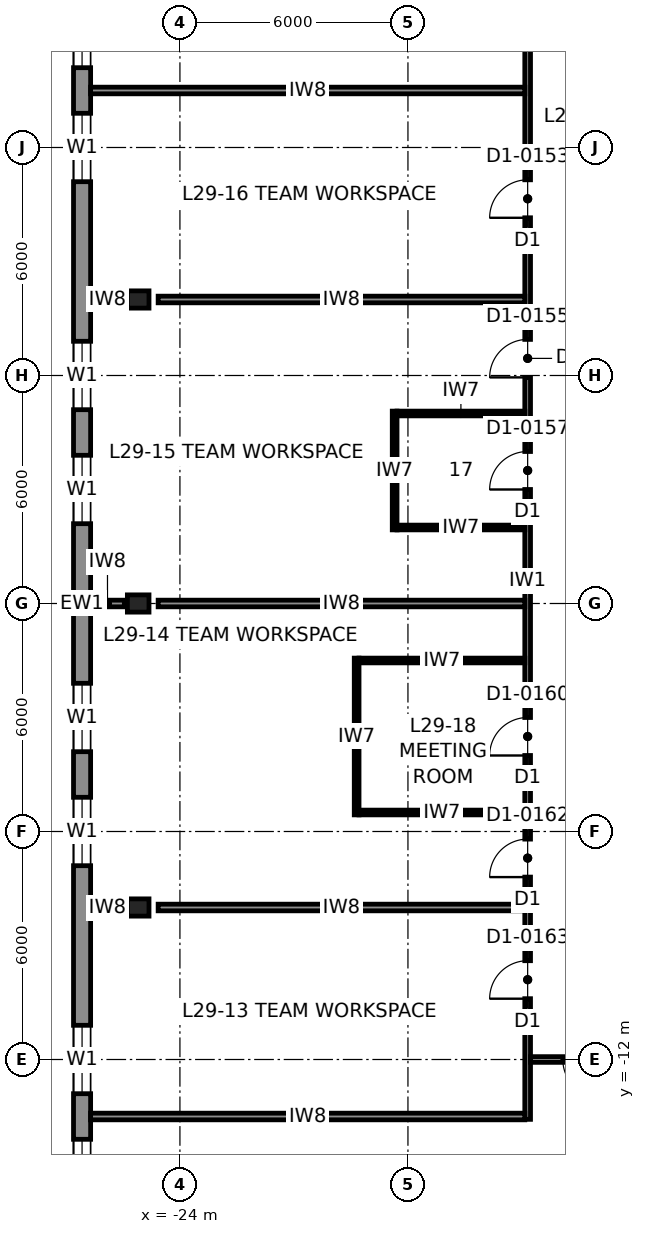
"""IFC4 building model, lengths in metres.
Left out: names, types, materials, properties, quantities, classifications, styles, units other than length and angle.
Written with IfcOpenShell. Run it as: python <this file> out.ifc"""

import sys

from ifc_helpers import new_model, si_unit, direction, frame, frame_2d, origin, origin_2d, place, context, subcontext, project, spatial, rectangle, i_section, extrude, element, fill, save


model = new_model("IFC4")
c1 = context("Model", 3, precision=1e-05, world=origin(), true_north=direction((0.0, 1.0)))
c2 = subcontext(c1, "Body", "Model", "MODEL_VIEW")
j1 = project(units=[si_unit("LENGTHUNIT", "METRE"), si_unit("PLANEANGLEUNIT", "RADIAN")], contexts=[c1])
p1 = place(None, origin())
s1 = spatial("IfcSite", under=j1, at=p1, CompositionType="ELEMENT")
p2 = place(p1, origin())
s2 = spatial("IfcBuilding", under=s1, at=p2, CompositionType="ELEMENT")
p3 = place(p2, frame((0.0, 0.0, 143.8)))
s3 = spatial("IfcBuildingStorey", under=s2, at=p3, CompositionType="ELEMENT", Elevation=143.8)
for number, where, z_axis, x_axis in (
    (1, (-25.098, 0.0, 0.0), (0.04, 0.0, 0.999), (0.0, 1.0, 0.0)),
    (2, (-25.098, 8.0, 0.0), (0.04, 0.0, 0.999), (0.0, 1.0, 0.0)),
    (3, (-25.098, -8.0, 0.0), (0.04, 0.0, 0.999), (0.0, 1.0, 0.0)),
):
    element("IfcColumn", number, at=place(p3, frame(where, z_axis=z_axis, x_axis=x_axis)), inside=s3, PredefinedType="COLUMN", context=c2, shape_type="SweptSolid", body=[
        extrude(i_section(OverallWidth=0.454, OverallDepth=0.569, WebThickness=0.078, FlangeThickness=0.125, at=origin_2d()), origin(), (0.0, 0.0, 1.0), 4.003),
    ])
p4 = place(p3, frame((-26.575, 22.3, 0.0), z_axis=(0.0, 0.0, 1.0), x_axis=(0.0, -1.0, 0.0)))
e4 = element("IfcWall", 4, at=p4, inside=s3, PredefinedType="SOLIDWALL", context=c2, shape_type="SweptSolid", body=[
    extrude(rectangle(XDim=44.6, YDim=0.45, at=frame_2d((22.3, 0.0))), origin(), (0.0, 0.0, 1.0), 3.83),
])
p5 = place(p4, frame((3.4, 0.0, 0.7)))
e5 = element("IfcOpeningElement", 5, at=p5, cuts=e4, PredefinedType="OPENING", context=c2, shape_type="SweptSolid", body=[
    extrude(rectangle(XDim=1.8, YDim=2.6, at=frame_2d((0.9, 1.3))), frame((0.0, 0.235, 0.0), z_axis=(0.0, -1.0, 0.0), x_axis=(1.0, 0.0, 0.0)), (0.0, 0.0, 1.0), 0.47),
])
p6 = place(p4, frame((6.4, 0.0, 0.7)))
e6 = element("IfcOpeningElement", 6, at=p6, cuts=e4, PredefinedType="OPENING", context=c2, shape_type="SweptSolid", body=[
    extrude(rectangle(XDim=1.8, YDim=2.6, at=frame_2d((0.9, 1.3))), frame((0.0, 0.235, 0.0), z_axis=(0.0, -1.0, 0.0), x_axis=(1.0, 0.0, 0.0)), (0.0, 0.0, 1.0), 0.47),
])
p7 = place(p4, frame((9.4, 0.0, 0.7)))
e7 = element("IfcOpeningElement", 7, at=p7, cuts=e4, PredefinedType="OPENING", context=c2, shape_type="SweptSolid", body=[
    extrude(rectangle(XDim=1.8, YDim=2.6, at=frame_2d((0.9, 1.3))), frame((0.0, 0.235, 0.0), z_axis=(0.0, -1.0, 0.0), x_axis=(1.0, 0.0, 0.0)), (0.0, 0.0, 1.0), 0.47),
])
p8 = place(p4, frame((15.4, 0.0, 0.7)))
e8 = element("IfcOpeningElement", 8, at=p8, cuts=e4, PredefinedType="OPENING", context=c2, shape_type="SweptSolid", body=[
    extrude(rectangle(XDim=1.8, YDim=2.6, at=frame_2d((0.9, 1.3))), frame((0.0, 0.235, 0.0), z_axis=(0.0, -1.0, 0.0), x_axis=(1.0, 0.0, 0.0)), (0.0, 0.0, 1.0), 0.47),
])
p9 = place(p4, frame((18.4, 0.0, 0.7)))
e9 = element("IfcOpeningElement", 9, at=p9, cuts=e4, PredefinedType="OPENING", context=c2, shape_type="SweptSolid", body=[
    extrude(rectangle(XDim=1.8, YDim=2.6, at=frame_2d((0.9, 1.3))), frame((0.0, 0.235, 0.0), z_axis=(0.0, -1.0, 0.0), x_axis=(1.0, 0.0, 0.0)), (0.0, 0.0, 1.0), 0.47),
])
p10 = place(p4, frame((24.4, 0.0, 0.7)))
e10 = element("IfcOpeningElement", 10, at=p10, cuts=e4, PredefinedType="OPENING", context=c2, shape_type="SweptSolid", body=[
    extrude(rectangle(XDim=1.8, YDim=2.6, at=frame_2d((0.9, 1.3))), frame((0.0, 0.235, 0.0), z_axis=(0.0, -1.0, 0.0), x_axis=(1.0, 0.0, 0.0)), (0.0, 0.0, 1.0), 0.47),
])
p11 = place(p4, frame((27.4, 0.0, 0.7)))
e11 = element("IfcOpeningElement", 11, at=p11, cuts=e4, PredefinedType="OPENING", context=c2, shape_type="SweptSolid", body=[
    extrude(rectangle(XDim=1.8, YDim=2.6, at=frame_2d((0.9, 1.3))), frame((0.0, 0.235, 0.0), z_axis=(0.0, -1.0, 0.0), x_axis=(1.0, 0.0, 0.0)), (0.0, 0.0, 1.0), 0.47),
])
p12 = place(p4, frame((33.4, 0.0, 0.7)))
e12 = element("IfcOpeningElement", 12, at=p12, cuts=e4, PredefinedType="OPENING", context=c2, shape_type="SweptSolid", body=[
    extrude(rectangle(XDim=1.8, YDim=2.6, at=frame_2d((0.9, 1.3))), frame((0.0, 0.235, 0.0), z_axis=(0.0, -1.0, 0.0), x_axis=(1.0, 0.0, 0.0)), (0.0, 0.0, 1.0), 0.47),
])
p13 = place(p4, frame((36.4, 0.0, 0.7)))
e13 = element("IfcOpeningElement", 13, at=p13, cuts=e4, PredefinedType="OPENING", context=c2, shape_type="SweptSolid", body=[
    extrude(rectangle(XDim=1.8, YDim=2.6, at=frame_2d((0.9, 1.3))), frame((0.0, 0.235, 0.0), z_axis=(0.0, -1.0, 0.0), x_axis=(1.0, 0.0, 0.0)), (0.0, 0.0, 1.0), 0.47),
])
p14 = place(p4, frame((39.4, 0.0, 0.7)))
e14 = element("IfcOpeningElement", 14, at=p14, cuts=e4, PredefinedType="OPENING", context=c2, shape_type="SweptSolid", body=[
    extrude(rectangle(XDim=1.8, YDim=2.6, at=frame_2d((0.9, 1.3))), frame((0.0, 0.235, 0.0), z_axis=(0.0, -1.0, 0.0), x_axis=(1.0, 0.0, 0.0)), (0.0, 0.0, 1.0), 0.47),
])
p15 = place(p3, frame((-14.85, 14.775, 0.0), z_axis=(0.0, 0.0, 1.0), x_axis=(0.0, -1.0, 0.0)))
e15 = element("IfcWall", 15, at=p15, inside=s3, PredefinedType="PARTITIONING", context=c2, shape_type="SweptSolid", body=[
    extrude(rectangle(XDim=28.35, YDim=0.15, at=frame_2d((14.175, 0.0))), origin(), (0.0, 0.0, 1.0), 3.83),
])
p16 = place(p15, frame((24.175, 0.0, 0.0)))
e16 = element("IfcOpeningElement", 16, at=p16, cuts=e15, PredefinedType="OPENING", context=c2, shape_type="SweptSolid", body=[
    extrude(rectangle(XDim=1.0, YDim=2.3, at=frame_2d((0.5, 1.15))), frame((0.0, 0.085, 0.0), z_axis=(0.0, -1.0, 0.0), x_axis=(1.0, 0.0, 0.0)), (0.0, 0.0, 1.0), 0.17),
])
p17 = place(p15, frame((20.975, 0.0, 0.0)))
e17 = element("IfcOpeningElement", 17, at=p17, cuts=e15, PredefinedType="OPENING", context=c2, shape_type="SweptSolid", body=[
    extrude(rectangle(XDim=1.0, YDim=2.3, at=frame_2d((0.5, 1.15))), frame((0.0, 0.085, 0.0), z_axis=(0.0, -1.0, 0.0), x_axis=(1.0, 0.0, 0.0)), (0.0, 0.0, 1.0), 0.17),
])
p18 = place(p15, frame((7.825, 0.0, 0.0)))
e18 = element("IfcOpeningElement", 18, at=p18, cuts=e15, PredefinedType="OPENING", context=c2, shape_type="SweptSolid", body=[
    extrude(rectangle(XDim=1.0, YDim=2.3, at=frame_2d((0.5, 1.15))), frame((0.0, 0.085, 0.0), z_axis=(0.0, -1.0, 0.0), x_axis=(1.0, 0.0, 0.0)), (0.0, 0.0, 1.0), 0.17),
])
p19 = place(p15, frame((3.625, 0.0, 0.0)))
e19 = element("IfcOpeningElement", 19, at=p19, cuts=e15, PredefinedType="OPENING", context=c2, shape_type="SweptSolid", body=[
    extrude(rectangle(XDim=1.0, YDim=2.3, at=frame_2d((0.5, 1.15))), frame((0.0, 0.085, 0.0), z_axis=(0.0, -1.0, 0.0), x_axis=(1.0, 0.0, 0.0)), (0.0, 0.0, 1.0), 0.17),
])
p20 = place(p15, frame((10.775, 0.0, 0.0)))
e20 = element("IfcOpeningElement", 20, at=p20, cuts=e15, PredefinedType="OPENING", context=c2, shape_type="SweptSolid", body=[
    extrude(rectangle(XDim=1.0, YDim=2.3, at=frame_2d((0.5, 1.15))), frame((0.0, 0.085, 0.0), z_axis=(0.0, -1.0, 0.0), x_axis=(1.0, 0.0, 0.0)), (0.0, 0.0, 1.0), 0.17),
])
p21 = place(p15, frame((17.775, 0.0, 0.0)))
e21 = element("IfcOpeningElement", 21, at=p21, cuts=e15, PredefinedType="OPENING", context=c2, shape_type="SweptSolid", body=[
    extrude(rectangle(XDim=1.0, YDim=2.3, at=frame_2d((0.5, 1.15))), frame((0.0, 0.085, 0.0), z_axis=(0.0, -1.0, 0.0), x_axis=(1.0, 0.0, 0.0)), (0.0, 0.0, 1.0), 0.17),
])
p22 = place(p3, frame((-12.0, -12.0, 0.0), z_axis=(0.0, 0.0, 1.0), x_axis=(-1.0, 0.0, 0.0)))
e22 = element("IfcWall", 22, at=p22, inside=s3, PredefinedType="PARTITIONING", context=c2, shape_type="SweptSolid", body=[
    extrude(rectangle(XDim=2.775, YDim=0.15, at=frame_2d((1.387, 0.0))), origin(), (0.0, 0.0, 1.0), 3.83),
])
p23 = place(p22, frame((0.925, 0.0, 0.0)))
e23 = element("IfcOpeningElement", 23, at=p23, cuts=e22, PredefinedType="OPENING", context=c2, shape_type="SweptSolid", body=[
    extrude(rectangle(XDim=1.0, YDim=2.3, at=frame_2d((0.5, 1.15))), frame((0.0, 0.085, 0.0), z_axis=(0.0, -1.0, 0.0), x_axis=(1.0, 0.0, 0.0)), (0.0, 0.0, 1.0), 0.17),
])
for number, where, z_axis, x_axis in (
    (24, (-26.35, 13.5, 0.0), (0.0, 0.0, 1.0), (1.0, 0.0, 0.0)),
    (25, (-14.925, -13.5, 0.0), (0.0, 0.0, 1.0), (-1.0, 0.0, 0.0)),
):
    element("IfcWall", number, at=place(p3, frame(where, z_axis=z_axis, x_axis=x_axis)), inside=s3, PredefinedType="PARTITIONING", context=c2, shape_type="SweptSolid", body=[
        extrude(rectangle(XDim=11.425, YDim=0.175, at=frame_2d((5.712, 0.0))), origin(), (0.0, 0.0, 1.0), 3.83),
    ])
p24 = place(p3, frame((-14.925, -8.0, 0.0), z_axis=(0.0, 0.0, 1.0), x_axis=(-1.0, 0.0, 0.0)))
e26 = element("IfcWall", 26, at=p24, inside=s3, PredefinedType="PARTITIONING", context=c2, shape_type="SweptSolid", body=[
    extrude(rectangle(XDim=9.648, YDim=0.175, at=frame_2d((4.824, 0.0))), origin(), (0.0, 0.0, 1.0), 2.83),
])
p25 = place(p3, frame((-25.462, -8.0, 0.0), z_axis=(0.0, 0.0, 1.0), x_axis=(-1.0, 0.0, 0.0)))
e27 = element("IfcWall", 27, at=p25, inside=s3, PredefinedType="PARTITIONING", context=c2, shape_type="SweptSolid", body=[
    extrude(rectangle(XDim=0.888, YDim=0.175, at=frame_2d((0.444, 0.0))), origin(), (0.0, 0.0, 1.0), 3.83),
])
p26 = place(p3, frame((-14.925, 0.0, 0.0), z_axis=(0.0, 0.0, 1.0), x_axis=(-1.0, 0.0, 0.0)))
e28 = element("IfcWall", 28, at=p26, inside=s3, PredefinedType="PARTITIONING", context=c2, shape_type="SweptSolid", body=[
    extrude(rectangle(XDim=9.648, YDim=0.175, at=frame_2d((4.824, 0.0))), origin(), (0.0, 0.0, 1.0), 2.83),
])
p27 = place(p3, frame((-25.462, 0.0, 0.0), z_axis=(0.0, 0.0, 1.0), x_axis=(-1.0, 0.0, 0.0)))
e29 = element("IfcWall", 29, at=p27, inside=s3, PredefinedType="PARTITIONING", context=c2, shape_type="SweptSolid", body=[
    extrude(rectangle(XDim=0.888, YDim=0.175, at=frame_2d((0.444, 0.0))), origin(), (0.0, 0.0, 1.0), 3.83),
])
p28 = place(p3, frame((-14.925, 8.0, 0.0), z_axis=(0.0, 0.0, 1.0), x_axis=(-1.0, 0.0, 0.0)))
e30 = element("IfcWall", 30, at=p28, inside=s3, PredefinedType="PARTITIONING", context=c2, shape_type="SweptSolid", body=[
    extrude(rectangle(XDim=9.648, YDim=0.175, at=frame_2d((4.824, 0.0))), origin(), (0.0, 0.0, 1.0), 2.83),
])
p29 = place(p3, frame((-25.462, 8.0, 0.0), z_axis=(0.0, 0.0, 1.0), x_axis=(-1.0, 0.0, 0.0)))
e31 = element("IfcWall", 31, at=p29, inside=s3, PredefinedType="PARTITIONING", context=c2, shape_type="SweptSolid", body=[
    extrude(rectangle(XDim=0.888, YDim=0.175, at=frame_2d((0.444, 0.0))), origin(), (0.0, 0.0, 1.0), 3.83),
])
p30 = place(p3, frame((-18.35, 1.938, 0.0), z_axis=(0.0, 0.0, 1.0), x_axis=(0.0, 1.0, 0.0)))
e32 = element("IfcWall", 32, at=p30, inside=s3, PredefinedType="PARTITIONING", context=c2, shape_type="SweptSolid", body=[
    extrude(rectangle(XDim=3.125, YDim=0.125, at=frame_2d((1.562, 0.0))), origin(), (0.0, 0.0, 1.0), 3.83),
])
for number, where, z_axis, x_axis in (
    (33, (-14.925, 2.0, 0.0), (0.0, 0.0, 1.0), (-1.0, 0.0, 0.0)),
    (34, (-14.925, 5.0, 0.0), (0.0, 0.0, 1.0), (-1.0, 0.0, 0.0)),
):
    element("IfcWall", number, at=place(p3, frame(where, z_axis=z_axis, x_axis=x_axis)), inside=s3, PredefinedType="PARTITIONING", context=c2, shape_type="SweptSolid", body=[
        extrude(rectangle(XDim=3.363, YDim=0.125, at=frame_2d((1.681, 0.0))), origin(), (0.0, 0.0, 1.0), 3.83),
    ])
p31 = place(p3, frame((-19.35, -5.562, 0.0), z_axis=(0.0, 0.0, 1.0), x_axis=(0.0, 1.0, 0.0)))
e35 = element("IfcWall", 35, at=p31, inside=s3, PredefinedType="PARTITIONING", context=c2, shape_type="SweptSolid", body=[
    extrude(rectangle(XDim=4.125, YDim=0.125, at=frame_2d((2.062, 0.0))), origin(), (0.0, 0.0, 1.0), 3.83),
])
for number, where, z_axis, x_axis in (
    (36, (-14.925, -5.5, 0.0), (0.0, 0.0, 1.0), (-1.0, 0.0, 0.0)),
    (37, (-14.925, -1.5, 0.0), (0.0, 0.0, 1.0), (-1.0, 0.0, 0.0)),
):
    element("IfcWall", number, at=place(p3, frame(where, z_axis=z_axis, x_axis=x_axis)), inside=s3, PredefinedType="PARTITIONING", context=c2, shape_type="SweptSolid", body=[
        extrude(rectangle(XDim=4.363, YDim=0.125, at=frame_2d((2.181, 0.0))), origin(), (0.0, 0.0, 1.0), 3.83),
    ])
p32 = place(p6, origin())
e38 = element("IfcWindow", 38, at=p32, inside=s3, PartitioningType="SINGLE_PANEL", PredefinedType="WINDOW", context=c2, shape_type="SweptSolid", body=[
    extrude(rectangle(XDim=1.8, YDim=2.6, at=frame_2d((0.9, 1.3))), frame((0.0, 0.03, 0.0), z_axis=(0.0, -1.0, 0.0), x_axis=(1.0, 0.0, 0.0)), (0.0, 0.0, 1.0), 0.06),
])
fill(e6, e38)
p33 = place(p7, origin())
e39 = element("IfcWindow", 39, at=p33, inside=s3, PartitioningType="SINGLE_PANEL", PredefinedType="WINDOW", context=c2, shape_type="SweptSolid", body=[
    extrude(rectangle(XDim=1.8, YDim=2.6, at=frame_2d((0.9, 1.3))), frame((0.0, 0.03, 0.0), z_axis=(0.0, -1.0, 0.0), x_axis=(1.0, 0.0, 0.0)), (0.0, 0.0, 1.0), 0.06),
])
fill(e7, e39)
p34 = place(p8, origin())
e40 = element("IfcWindow", 40, at=p34, inside=s3, PartitioningType="SINGLE_PANEL", PredefinedType="WINDOW", context=c2, shape_type="SweptSolid", body=[
    extrude(rectangle(XDim=1.8, YDim=2.6, at=frame_2d((0.9, 1.3))), frame((0.0, 0.03, 0.0), z_axis=(0.0, -1.0, 0.0), x_axis=(1.0, 0.0, 0.0)), (0.0, 0.0, 1.0), 0.06),
])
fill(e8, e40)
p35 = place(p9, origin())
e41 = element("IfcWindow", 41, at=p35, inside=s3, PartitioningType="SINGLE_PANEL", PredefinedType="WINDOW", context=c2, shape_type="SweptSolid", body=[
    extrude(rectangle(XDim=1.8, YDim=2.6, at=frame_2d((0.9, 1.3))), frame((0.0, 0.03, 0.0), z_axis=(0.0, -1.0, 0.0), x_axis=(1.0, 0.0, 0.0)), (0.0, 0.0, 1.0), 0.06),
])
fill(e9, e41)
p36 = place(p10, origin())
e42 = element("IfcWindow", 42, at=p36, inside=s3, PartitioningType="SINGLE_PANEL", PredefinedType="WINDOW", context=c2, shape_type="SweptSolid", body=[
    extrude(rectangle(XDim=1.8, YDim=2.6, at=frame_2d((0.9, 1.3))), frame((0.0, 0.03, 0.0), z_axis=(0.0, -1.0, 0.0), x_axis=(1.0, 0.0, 0.0)), (0.0, 0.0, 1.0), 0.06),
])
fill(e10, e42)
p37 = place(p11, origin())
e43 = element("IfcWindow", 43, at=p37, inside=s3, PartitioningType="SINGLE_PANEL", PredefinedType="WINDOW", context=c2, shape_type="SweptSolid", body=[
    extrude(rectangle(XDim=1.8, YDim=2.6, at=frame_2d((0.9, 1.3))), frame((0.0, 0.03, 0.0), z_axis=(0.0, -1.0, 0.0), x_axis=(1.0, 0.0, 0.0)), (0.0, 0.0, 1.0), 0.06),
])
fill(e11, e43)
p38 = place(p12, origin())
e44 = element("IfcWindow", 44, at=p38, inside=s3, PartitioningType="SINGLE_PANEL", PredefinedType="WINDOW", context=c2, shape_type="SweptSolid", body=[
    extrude(rectangle(XDim=1.8, YDim=2.6, at=frame_2d((0.9, 1.3))), frame((0.0, 0.03, 0.0), z_axis=(0.0, -1.0, 0.0), x_axis=(1.0, 0.0, 0.0)), (0.0, 0.0, 1.0), 0.06),
])
fill(e12, e44)
p39 = place(p13, origin())
e45 = element("IfcWindow", 45, at=p39, inside=s3, PartitioningType="SINGLE_PANEL", PredefinedType="WINDOW", context=c2, shape_type="SweptSolid", body=[
    extrude(rectangle(XDim=1.8, YDim=2.6, at=frame_2d((0.9, 1.3))), frame((0.0, 0.03, 0.0), z_axis=(0.0, -1.0, 0.0), x_axis=(1.0, 0.0, 0.0)), (0.0, 0.0, 1.0), 0.06),
])
fill(e13, e45)
p40 = place(p23, origin())
e46 = element("IfcDoor", 46, at=p40, inside=s3, OperationType="SINGLE_SWING_LEFT", PredefinedType="DOOR", context=c2, shape_type="SweptSolid", body=[
    extrude(rectangle(XDim=1.0, YDim=2.3, at=frame_2d((0.5, 1.15))), frame((0.0, 0.025, 0.0), z_axis=(0.0, -1.0, 0.0), x_axis=(1.0, 0.0, 0.0)), (0.0, 0.0, 1.0), 0.05),
])
fill(e23, e46)
p41 = place(p16, frame((1.0, 0.0, 0.0), z_axis=(0.0, 0.0, 1.0), x_axis=(-1.0, 0.0, 0.0)))
e47 = element("IfcDoor", 47, at=p41, inside=s3, OperationType="SINGLE_SWING_LEFT", PredefinedType="DOOR", context=c2, shape_type="SweptSolid", body=[
    extrude(rectangle(XDim=1.0, YDim=2.3, at=frame_2d((0.5, 1.15))), frame((0.0, 0.025, 0.0), z_axis=(0.0, -1.0, 0.0), x_axis=(1.0, 0.0, 0.0)), (0.0, 0.0, 1.0), 0.05),
])
fill(e16, e47)
p42 = place(p17, frame((1.0, 0.0, 0.0), z_axis=(0.0, 0.0, 1.0), x_axis=(-1.0, 0.0, 0.0)))
e48 = element("IfcDoor", 48, at=p42, inside=s3, OperationType="SINGLE_SWING_LEFT", PredefinedType="DOOR", context=c2, shape_type="SweptSolid", body=[
    extrude(rectangle(XDim=1.0, YDim=2.3, at=frame_2d((0.5, 1.15))), frame((0.0, 0.025, 0.0), z_axis=(0.0, -1.0, 0.0), x_axis=(1.0, 0.0, 0.0)), (0.0, 0.0, 1.0), 0.05),
])
fill(e17, e48)
p43 = place(p18, frame((1.0, 0.0, 0.0), z_axis=(0.0, 0.0, 1.0), x_axis=(-1.0, 0.0, 0.0)))
e49 = element("IfcDoor", 49, at=p43, inside=s3, OperationType="SINGLE_SWING_LEFT", PredefinedType="DOOR", context=c2, shape_type="SweptSolid", body=[
    extrude(rectangle(XDim=1.0, YDim=2.3, at=frame_2d((0.5, 1.15))), frame((0.0, 0.025, 0.0), z_axis=(0.0, -1.0, 0.0), x_axis=(1.0, 0.0, 0.0)), (0.0, 0.0, 1.0), 0.05),
])
fill(e18, e49)
p44 = place(p19, frame((1.0, 0.0, 0.0), z_axis=(0.0, 0.0, 1.0), x_axis=(-1.0, 0.0, 0.0)))
e50 = element("IfcDoor", 50, at=p44, inside=s3, OperationType="SINGLE_SWING_LEFT", PredefinedType="DOOR", context=c2, shape_type="SweptSolid", body=[
    extrude(rectangle(XDim=1.0, YDim=2.3, at=frame_2d((0.5, 1.15))), frame((0.0, 0.025, 0.0), z_axis=(0.0, -1.0, 0.0), x_axis=(1.0, 0.0, 0.0)), (0.0, 0.0, 1.0), 0.05),
])
fill(e19, e50)
p45 = place(p20, frame((1.0, 0.0, 0.0), z_axis=(0.0, 0.0, 1.0), x_axis=(-1.0, 0.0, 0.0)))
e51 = element("IfcDoor", 51, at=p45, inside=s3, OperationType="SINGLE_SWING_LEFT", PredefinedType="DOOR", context=c2, shape_type="SweptSolid", body=[
    extrude(rectangle(XDim=1.0, YDim=2.3, at=frame_2d((0.5, 1.15))), frame((0.0, 0.025, 0.0), z_axis=(0.0, -1.0, 0.0), x_axis=(1.0, 0.0, 0.0)), (0.0, 0.0, 1.0), 0.05),
])
fill(e20, e51)
p46 = place(p21, frame((1.0, 0.0, 0.0), z_axis=(0.0, 0.0, 1.0), x_axis=(-1.0, 0.0, 0.0)))
e52 = element("IfcDoor", 52, at=p46, inside=s3, OperationType="SINGLE_SWING_LEFT", PredefinedType="DOOR", context=c2, shape_type="SweptSolid", body=[
    extrude(rectangle(XDim=1.0, YDim=2.3, at=frame_2d((0.5, 1.15))), frame((0.0, 0.025, 0.0), z_axis=(0.0, -1.0, 0.0), x_axis=(1.0, 0.0, 0.0)), (0.0, 0.0, 1.0), 0.05),
])
fill(e21, e52)
save(model, sys.argv[1])
